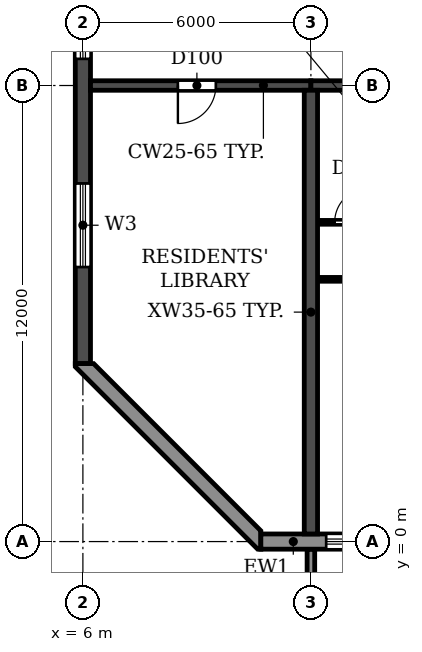
"""IFC4 building model, lengths in metres.
Left out: names, types, materials, properties, quantities, classifications, styles, units other than length and angle.
Written with IfcOpenShell. Run it as: python <this file> out.ifc"""

import sys

from ifc_helpers import new_model, si_unit, direction, frame, frame_2d, origin, place, context, subcontext, project, spatial, polyline, rectangle, outline, extrude, source, transform, mapped, element, fill, save


model = new_model("IFC4")
c1 = context("Model", 3, precision=1e-05, world=origin(), true_north=direction((0.0, 1.0)))
c2 = subcontext(c1, "Body", "Model", "MODEL_VIEW")
j1 = project(units=[si_unit("LENGTHUNIT", "METRE"), si_unit("PLANEANGLEUNIT", "RADIAN")], contexts=[c1])
p1 = place(None, origin())
s1 = spatial("IfcSite", under=j1, at=p1, CompositionType="ELEMENT")
p2 = place(p1, origin())
s2 = spatial("IfcBuilding", under=s1, at=p2, CompositionType="ELEMENT")
p3 = place(p2, frame((0.0, 0.0, 72.9)))
s3 = spatial("IfcBuildingStorey", under=s2, at=p3, CompositionType="ELEMENT", Elevation=72.9)
p4 = place(p3, frame((12.0, 0.2, 0.0), z_axis=(0.0, 0.0, 1.0), x_axis=(0.0, 1.0, 0.0)))
e1 = element("IfcWall", 1, at=p4, inside=s3, PredefinedType="SHEAR", context=c2, shape_type="SweptSolid", body=[
    extrude(rectangle(XDim=11.675, YDim=0.35, at=frame_2d((5.837, 0.0))), origin(), (0.0, 0.0, 1.0), 3.06),
])
p5 = place(p3, frame((6.0, 4.683, 0.0), z_axis=(0.0, 0.0, 1.0), x_axis=(0.0, 1.0, 0.0)))
e2 = element("IfcWall", 2, at=p5, inside=s3, PredefinedType="SHEAR", context=c2, shape_type="SweptSolid", body=[
    extrude(rectangle(XDim=34.234, YDim=0.4, at=frame_2d((17.117, 0.0))), origin(), (0.0, 0.0, 1.0), 3.06),
])
p6 = place(p5, frame((23.817, 0.0, 0.9)))
e3 = element("IfcOpeningElement", 3, at=p6, cuts=e2, PredefinedType="OPENING", context=c2, shape_type="SweptSolid", body=[
    extrude(rectangle(XDim=1.2, YDim=1.5, at=frame_2d((0.6, 0.75))), frame((0.0, 0.21, 0.0), z_axis=(0.0, -1.0, 0.0), x_axis=(1.0, 0.0, 0.0)), (0.0, 0.0, 1.0), 0.42),
])
p7 = place(p5, frame((8.017, 0.0, 0.9)))
e4 = element("IfcOpeningElement", 4, at=p7, cuts=e2, PredefinedType="OPENING", context=c2, shape_type="SweptSolid", body=[
    extrude(rectangle(XDim=1.2, YDim=1.5, at=frame_2d((0.6, 0.75))), frame((0.0, 0.21, 0.0), z_axis=(0.0, -1.0, 0.0), x_axis=(1.0, 0.0, 0.0)), (0.0, 0.0, 1.0), 0.42),
])
p8 = place(p5, frame((15.917, 0.0, 0.9)))
e5 = element("IfcOpeningElement", 5, at=p8, cuts=e2, PredefinedType="OPENING", context=c2, shape_type="SweptSolid", body=[
    extrude(rectangle(XDim=1.2, YDim=1.5, at=frame_2d((0.6, 0.75))), frame((0.0, 0.21, 0.0), z_axis=(0.0, -1.0, 0.0), x_axis=(1.0, 0.0, 0.0)), (0.0, 0.0, 1.0), 0.42),
])
p9 = place(p5, frame((28.894, 0.0, 0.6)))
e6 = element("IfcOpeningElement", 6, at=p9, cuts=e2, PredefinedType="OPENING", context=c2, shape_type="SweptSolid", body=[
    extrude(rectangle(XDim=2.2, YDim=1.8, at=frame_2d((1.1, 0.9))), frame((0.0, 0.21, 0.0), z_axis=(0.0, -1.0, 0.0), x_axis=(1.0, 0.0, 0.0)), (0.0, 0.0, 1.0), 0.42),
])
p10 = place(p5, frame((2.541, 0.0, 0.6)))
e7 = element("IfcOpeningElement", 7, at=p10, cuts=e2, PredefinedType="OPENING", context=c2, shape_type="SweptSolid", body=[
    extrude(rectangle(XDim=2.2, YDim=1.8, at=frame_2d((1.1, 0.9))), frame((0.0, 0.21, 0.0), z_axis=(0.0, -1.0, 0.0), x_axis=(1.0, 0.0, 0.0)), (0.0, 0.0, 1.0), 0.42),
])
p11 = place(p3, frame((6.2, 12.0, 0.0), z_axis=(0.0, 0.0, 1.0), x_axis=(1.0, 0.0, 0.0)))
e8 = element("IfcWall", 8, at=p11, inside=s3, PredefinedType="SHEAR", context=c2, shape_type="SweptSolid", body=[
    extrude(rectangle(XDim=5.8, YDim=0.25, at=frame_2d((2.9, 0.0))), origin(), (0.0, 0.0, 1.0), 2.46),
])
p12 = place(p11, frame((2.3, 0.0, 0.0)))
e9 = element("IfcOpeningElement", 9, at=p12, cuts=e8, PredefinedType="OPENING", context=c2, shape_type="SweptSolid", body=[
    extrude(rectangle(XDim=1.0, YDim=2.1, at=frame_2d((0.5, 1.05))), frame((0.0, 0.135, 0.0), z_axis=(0.0, -1.0, 0.0), x_axis=(1.0, 0.0, 0.0)), (0.0, 0.0, 1.0), 0.27),
])
p13 = place(p3, frame((12.0, 12.0, 0.0), z_axis=(0.0, 0.0, 1.0), x_axis=(1.0, 0.0, 0.0)))
e10 = element("IfcWall", 10, at=p13, inside=s3, PredefinedType="SHEAR", context=c2, shape_type="SweptSolid", body=[
    extrude(rectangle(XDim=6.0, YDim=0.25, at=frame_2d((3.0, 0.0))), origin(), (0.0, 0.0, 1.0), 2.46),
])
p14 = place(p13, frame((2.55, 0.0, 0.0)))
e11 = element("IfcOpeningElement", 11, at=p14, cuts=e10, PredefinedType="OPENING", context=c2, shape_type="SweptSolid", body=[
    extrude(rectangle(XDim=1.0, YDim=2.1, at=frame_2d((0.5, 1.05))), frame((0.0, 0.135, 0.0), z_axis=(0.0, -1.0, 0.0), x_axis=(1.0, 0.0, 0.0)), (0.0, 0.0, 1.0), 0.27),
])
p15 = place(p3, frame((10.683, 0.0, 0.0), z_axis=(0.0, 0.0, 1.0), x_axis=(1.0, 0.0, 0.0)))
e12 = element("IfcWall", 12, at=p15, inside=s3, PredefinedType="STANDARD", context=c2, shape_type="SweptSolid", body=[
    extrude(rectangle(XDim=80.634, YDim=0.4, at=frame_2d((40.317, 0.0))), origin(), (0.0, 0.0, 1.0), 3.06),
])
p16 = place(p15, frame((1.717, 0.0, 0.9)))
e13 = element("IfcOpeningElement", 13, at=p16, cuts=e12, PredefinedType="OPENING", context=c2, shape_type="SweptSolid", body=[
    extrude(rectangle(XDim=2.2, YDim=1.5, at=frame_2d((1.1, 0.75))), frame((0.0, 0.21, 0.0), z_axis=(0.0, -1.0, 0.0), x_axis=(1.0, 0.0, 0.0)), (0.0, 0.0, 1.0), 0.42),
])
p17 = place(p15, frame((4.917, 0.0, 0.0)))
e14 = element("IfcOpeningElement", 14, at=p17, cuts=e12, PredefinedType="OPENING", context=c2, shape_type="SweptSolid", body=[
    extrude(rectangle(XDim=1.8, YDim=2.4, at=frame_2d((0.9, 1.2))), frame((0.0, 0.21, 0.0), z_axis=(0.0, -1.0, 0.0), x_axis=(1.0, 0.0, 0.0)), (0.0, 0.0, 1.0), 0.42),
])
p18 = place(p15, frame((7.717, 0.0, 0.9)))
e15 = element("IfcOpeningElement", 15, at=p18, cuts=e12, PredefinedType="OPENING", context=c2, shape_type="SweptSolid", body=[
    extrude(rectangle(XDim=2.2, YDim=1.5, at=frame_2d((1.1, 0.75))), frame((0.0, 0.21, 0.0), z_axis=(0.0, -1.0, 0.0), x_axis=(1.0, 0.0, 0.0)), (0.0, 0.0, 1.0), 0.42),
])
p19 = place(p15, frame((10.717, 0.0, 0.9)))
e16 = element("IfcOpeningElement", 16, at=p19, cuts=e12, PredefinedType="OPENING", context=c2, shape_type="SweptSolid", body=[
    extrude(rectangle(XDim=2.2, YDim=1.5, at=frame_2d((1.1, 0.75))), frame((0.0, 0.21, 0.0), z_axis=(0.0, -1.0, 0.0), x_axis=(1.0, 0.0, 0.0)), (0.0, 0.0, 1.0), 0.42),
])
p20 = place(p15, frame((13.717, 0.0, 0.9)))
e17 = element("IfcOpeningElement", 17, at=p20, cuts=e12, PredefinedType="OPENING", context=c2, shape_type="SweptSolid", body=[
    extrude(rectangle(XDim=2.2, YDim=1.5, at=frame_2d((1.1, 0.75))), frame((0.0, 0.21, 0.0), z_axis=(0.0, -1.0, 0.0), x_axis=(1.0, 0.0, 0.0)), (0.0, 0.0, 1.0), 0.42),
])
p21 = place(p15, frame((16.917, 0.0, 0.0)))
e18 = element("IfcOpeningElement", 18, at=p21, cuts=e12, PredefinedType="OPENING", context=c2, shape_type="SweptSolid", body=[
    extrude(rectangle(XDim=1.8, YDim=2.4, at=frame_2d((0.9, 1.2))), frame((0.0, 0.21, 0.0), z_axis=(0.0, -1.0, 0.0), x_axis=(1.0, 0.0, 0.0)), (0.0, 0.0, 1.0), 0.42),
])
p22 = place(p15, frame((19.717, 0.0, 0.9)))
e19 = element("IfcOpeningElement", 19, at=p22, cuts=e12, PredefinedType="OPENING", context=c2, shape_type="SweptSolid", body=[
    extrude(rectangle(XDim=2.2, YDim=1.5, at=frame_2d((1.1, 0.75))), frame((0.0, 0.21, 0.0), z_axis=(0.0, -1.0, 0.0), x_axis=(1.0, 0.0, 0.0)), (0.0, 0.0, 1.0), 0.42),
])
p23 = place(p15, frame((22.717, 0.0, 0.9)))
e20 = element("IfcOpeningElement", 20, at=p23, cuts=e12, PredefinedType="OPENING", context=c2, shape_type="SweptSolid", body=[
    extrude(rectangle(XDim=2.2, YDim=1.5, at=frame_2d((1.1, 0.75))), frame((0.0, 0.21, 0.0), z_axis=(0.0, -1.0, 0.0), x_axis=(1.0, 0.0, 0.0)), (0.0, 0.0, 1.0), 0.42),
])
p24 = place(p15, frame((25.917, 0.0, 0.0)))
e21 = element("IfcOpeningElement", 21, at=p24, cuts=e12, PredefinedType="OPENING", context=c2, shape_type="SweptSolid", body=[
    extrude(rectangle(XDim=1.8, YDim=2.4, at=frame_2d((0.9, 1.2))), frame((0.0, 0.21, 0.0), z_axis=(0.0, -1.0, 0.0), x_axis=(1.0, 0.0, 0.0)), (0.0, 0.0, 1.0), 0.42),
])
p25 = place(p15, frame((28.717, 0.0, 0.9)))
e22 = element("IfcOpeningElement", 22, at=p25, cuts=e12, PredefinedType="OPENING", context=c2, shape_type="SweptSolid", body=[
    extrude(rectangle(XDim=2.2, YDim=1.5, at=frame_2d((1.1, 0.75))), frame((0.0, 0.21, 0.0), z_axis=(0.0, -1.0, 0.0), x_axis=(1.0, 0.0, 0.0)), (0.0, 0.0, 1.0), 0.42),
])
p26 = place(p15, frame((31.717, 0.0, 0.9)))
e23 = element("IfcOpeningElement", 23, at=p26, cuts=e12, PredefinedType="OPENING", context=c2, shape_type="SweptSolid", body=[
    extrude(rectangle(XDim=2.2, YDim=1.5, at=frame_2d((1.1, 0.75))), frame((0.0, 0.21, 0.0), z_axis=(0.0, -1.0, 0.0), x_axis=(1.0, 0.0, 0.0)), (0.0, 0.0, 1.0), 0.42),
])
p27 = place(p15, frame((34.717, 0.0, 0.9)))
e24 = element("IfcOpeningElement", 24, at=p27, cuts=e12, PredefinedType="OPENING", context=c2, shape_type="SweptSolid", body=[
    extrude(rectangle(XDim=2.2, YDim=1.5, at=frame_2d((1.1, 0.75))), frame((0.0, 0.21, 0.0), z_axis=(0.0, -1.0, 0.0), x_axis=(1.0, 0.0, 0.0)), (0.0, 0.0, 1.0), 0.42),
])
p28 = place(p15, frame((37.917, 0.0, 0.0)))
e25 = element("IfcOpeningElement", 25, at=p28, cuts=e12, PredefinedType="OPENING", context=c2, shape_type="SweptSolid", body=[
    extrude(rectangle(XDim=1.8, YDim=2.4, at=frame_2d((0.9, 1.2))), frame((0.0, 0.21, 0.0), z_axis=(0.0, -1.0, 0.0), x_axis=(1.0, 0.0, 0.0)), (0.0, 0.0, 1.0), 0.42),
])
p29 = place(p15, frame((40.717, 0.0, 0.9)))
e26 = element("IfcOpeningElement", 26, at=p29, cuts=e12, PredefinedType="OPENING", context=c2, shape_type="SweptSolid", body=[
    extrude(rectangle(XDim=2.2, YDim=1.5, at=frame_2d((1.1, 0.75))), frame((0.0, 0.21, 0.0), z_axis=(0.0, -1.0, 0.0), x_axis=(1.0, 0.0, 0.0)), (0.0, 0.0, 1.0), 0.42),
])
p30 = place(p15, frame((43.717, 0.0, 0.9)))
e27 = element("IfcOpeningElement", 27, at=p30, cuts=e12, PredefinedType="OPENING", context=c2, shape_type="SweptSolid", body=[
    extrude(rectangle(XDim=2.2, YDim=1.5, at=frame_2d((1.1, 0.75))), frame((0.0, 0.21, 0.0), z_axis=(0.0, -1.0, 0.0), x_axis=(1.0, 0.0, 0.0)), (0.0, 0.0, 1.0), 0.42),
])
p31 = place(p15, frame((46.717, 0.0, 0.9)))
e28 = element("IfcOpeningElement", 28, at=p31, cuts=e12, PredefinedType="OPENING", context=c2, shape_type="SweptSolid", body=[
    extrude(rectangle(XDim=2.2, YDim=1.5, at=frame_2d((1.1, 0.75))), frame((0.0, 0.21, 0.0), z_axis=(0.0, -1.0, 0.0), x_axis=(1.0, 0.0, 0.0)), (0.0, 0.0, 1.0), 0.42),
])
p32 = place(p15, frame((49.917, 0.0, 0.0)))
e29 = element("IfcOpeningElement", 29, at=p32, cuts=e12, PredefinedType="OPENING", context=c2, shape_type="SweptSolid", body=[
    extrude(rectangle(XDim=1.8, YDim=2.4, at=frame_2d((0.9, 1.2))), frame((0.0, 0.21, 0.0), z_axis=(0.0, -1.0, 0.0), x_axis=(1.0, 0.0, 0.0)), (0.0, 0.0, 1.0), 0.42),
])
p33 = place(p15, frame((52.717, 0.0, 0.9)))
e30 = element("IfcOpeningElement", 30, at=p33, cuts=e12, PredefinedType="OPENING", context=c2, shape_type="SweptSolid", body=[
    extrude(rectangle(XDim=2.2, YDim=1.5, at=frame_2d((1.1, 0.75))), frame((0.0, 0.21, 0.0), z_axis=(0.0, -1.0, 0.0), x_axis=(1.0, 0.0, 0.0)), (0.0, 0.0, 1.0), 0.42),
])
p34 = place(p15, frame((55.717, 0.0, 0.9)))
e31 = element("IfcOpeningElement", 31, at=p34, cuts=e12, PredefinedType="OPENING", context=c2, shape_type="SweptSolid", body=[
    extrude(rectangle(XDim=2.2, YDim=1.5, at=frame_2d((1.1, 0.75))), frame((0.0, 0.21, 0.0), z_axis=(0.0, -1.0, 0.0), x_axis=(1.0, 0.0, 0.0)), (0.0, 0.0, 1.0), 0.42),
])
p35 = place(p15, frame((58.717, 0.0, 0.9)))
e32 = element("IfcOpeningElement", 32, at=p35, cuts=e12, PredefinedType="OPENING", context=c2, shape_type="SweptSolid", body=[
    extrude(rectangle(XDim=2.2, YDim=1.5, at=frame_2d((1.1, 0.75))), frame((0.0, 0.21, 0.0), z_axis=(0.0, -1.0, 0.0), x_axis=(1.0, 0.0, 0.0)), (0.0, 0.0, 1.0), 0.42),
])
p36 = place(p15, frame((61.717, 0.0, 0.9)))
e33 = element("IfcOpeningElement", 33, at=p36, cuts=e12, PredefinedType="OPENING", context=c2, shape_type="SweptSolid", body=[
    extrude(rectangle(XDim=2.2, YDim=1.5, at=frame_2d((1.1, 0.75))), frame((0.0, 0.21, 0.0), z_axis=(0.0, -1.0, 0.0), x_axis=(1.0, 0.0, 0.0)), (0.0, 0.0, 1.0), 0.42),
])
p37 = place(p15, frame((64.917, 0.0, 0.0)))
e34 = element("IfcOpeningElement", 34, at=p37, cuts=e12, PredefinedType="OPENING", context=c2, shape_type="SweptSolid", body=[
    extrude(rectangle(XDim=1.8, YDim=2.4, at=frame_2d((0.9, 1.2))), frame((0.0, 0.21, 0.0), z_axis=(0.0, -1.0, 0.0), x_axis=(1.0, 0.0, 0.0)), (0.0, 0.0, 1.0), 0.42),
])
p38 = place(p15, frame((67.717, 0.0, 0.9)))
e35 = element("IfcOpeningElement", 35, at=p38, cuts=e12, PredefinedType="OPENING", context=c2, shape_type="SweptSolid", body=[
    extrude(rectangle(XDim=2.2, YDim=1.5, at=frame_2d((1.1, 0.75))), frame((0.0, 0.21, 0.0), z_axis=(0.0, -1.0, 0.0), x_axis=(1.0, 0.0, 0.0)), (0.0, 0.0, 1.0), 0.42),
])
p39 = place(p15, frame((70.717, 0.0, 0.9)))
e36 = element("IfcOpeningElement", 36, at=p39, cuts=e12, PredefinedType="OPENING", context=c2, shape_type="SweptSolid", body=[
    extrude(rectangle(XDim=2.2, YDim=1.5, at=frame_2d((1.1, 0.75))), frame((0.0, 0.21, 0.0), z_axis=(0.0, -1.0, 0.0), x_axis=(1.0, 0.0, 0.0)), (0.0, 0.0, 1.0), 0.42),
])
p40 = place(p15, frame((73.917, 0.0, 0.0)))
e37 = element("IfcOpeningElement", 37, at=p40, cuts=e12, PredefinedType="OPENING", context=c2, shape_type="SweptSolid", body=[
    extrude(rectangle(XDim=1.8, YDim=2.4, at=frame_2d((0.9, 1.2))), frame((0.0, 0.21, 0.0), z_axis=(0.0, -1.0, 0.0), x_axis=(1.0, 0.0, 0.0)), (0.0, 0.0, 1.0), 0.42),
])
p41 = place(p15, frame((76.717, 0.0, 0.9)))
e38 = element("IfcOpeningElement", 38, at=p41, cuts=e12, PredefinedType="OPENING", context=c2, shape_type="SweptSolid", body=[
    extrude(rectangle(XDim=2.2, YDim=1.5, at=frame_2d((1.1, 0.75))), frame((0.0, 0.21, 0.0), z_axis=(0.0, -1.0, 0.0), x_axis=(1.0, 0.0, 0.0)), (0.0, 0.0, 1.0), 0.42),
])
p42 = place(p3, origin())
e39 = element("IfcWall", 39, at=p42, inside=s3, PredefinedType="STANDARD", context=c2, shape_type="SweptSolid", body=[
    extrude(outline(polyline([(5.8, 4.683), (5.8, 4.6), (10.6, -0.2), (10.683, -0.2), (10.683, 0.283), (6.283, 4.683), (5.8, 4.683)])), origin(), (0.0, 0.0, 1.0), 3.06),
])
m1 = source(origin(), c2, "Body", "SweptSolid", [
    extrude(outline(polyline([(0.0, 0.0), (0.2, 0.0), (0.2, 1.65), (0.0, 1.65), (0.0, 0.0)])), origin(), (0.0, 0.0, 1.0), 3.1),
])
p43 = place(p3, frame((11.9, -1.85, 0.0)))
e40 = element("IfcWall", 40, at=p43, inside=s3, PredefinedType="STANDARD", context=c2, shape_type="MappedRepresentation", body=[
    mapped(m1, transform((0.0, 0.0, 0.0))),
])
p44 = place(p3, frame((12.185, 6.9, 0.0), z_axis=(0.0, 0.0, 1.0), x_axis=(1.0, 0.0, 0.0)))
e41 = element("IfcWall", 41, at=p44, inside=s3, PredefinedType="PARTITIONING", context=c2, shape_type="SweptSolid", body=[
    extrude(rectangle(XDim=2.865, YDim=0.1, at=frame_2d((1.433, 0.0))), origin(), (0.0, 0.0, 1.0), 3.06),
])
p45 = place(p44, frame((1.415, 0.0, 0.0)))
e42 = element("IfcOpeningElement", 42, at=p45, cuts=e41, PredefinedType="OPENING", context=c2, shape_type="SweptSolid", body=[
    extrude(rectangle(XDim=0.9, YDim=2.1, at=frame_2d((0.45, 1.05))), frame((0.0, 0.06, 0.0), z_axis=(0.0, -1.0, 0.0), x_axis=(1.0, 0.0, 0.0)), (0.0, 0.0, 1.0), 0.12),
])
p46 = place(p3, frame((12.185, 8.4, 0.0), z_axis=(0.0, 0.0, 1.0), x_axis=(1.0, 0.0, 0.0)))
e43 = element("IfcWall", 43, at=p46, inside=s3, PredefinedType="PARTITIONING", context=c2, shape_type="SweptSolid", body=[
    extrude(rectangle(XDim=2.015, YDim=0.1, at=frame_2d((1.007, 0.0))), origin(), (0.0, 0.0, 1.0), 3.06),
])
p47 = place(p46, frame((0.44, 0.0, 0.0)))
e44 = element("IfcOpeningElement", 44, at=p47, cuts=e43, PredefinedType="OPENING", context=c2, shape_type="SweptSolid", body=[
    extrude(rectangle(XDim=0.9, YDim=2.1, at=frame_2d((0.45, 1.05))), frame((0.0, 0.06, 0.0), z_axis=(0.0, -1.0, 0.0), x_axis=(1.0, 0.0, 0.0)), (0.0, 0.0, 1.0), 0.12),
])
p48 = place(p16, origin())
e45 = element("IfcWindow", 45, at=p48, inside=s3, PartitioningType="DOUBLE_PANEL_HORIZONTAL", PredefinedType="WINDOW", context=c2, shape_type="SweptSolid", body=[
    extrude(rectangle(XDim=2.2, YDim=1.5, at=frame_2d((1.1, 0.75))), frame((0.0, 0.03, 0.0), z_axis=(0.0, -1.0, 0.0), x_axis=(1.0, 0.0, 0.0)), (0.0, 0.0, 1.0), 0.06),
])
fill(e13, e45)
p49 = place(p7, origin())
e46 = element("IfcWindow", 46, at=p49, inside=s3, PartitioningType="SINGLE_PANEL", PredefinedType="WINDOW", context=c2, shape_type="SweptSolid", body=[
    extrude(rectangle(XDim=1.2, YDim=1.5, at=frame_2d((0.6, 0.75))), frame((0.0, 0.03, 0.0), z_axis=(0.0, -1.0, 0.0), x_axis=(1.0, 0.0, 0.0)), (0.0, 0.0, 1.0), 0.06),
])
fill(e4, e46)
p50 = place(p10, origin())
e47 = element("IfcWindow", 47, at=p50, inside=s3, PartitioningType="DOUBLE_PANEL_HORIZONTAL", PredefinedType="WINDOW", context=c2, shape_type="SweptSolid", body=[
    extrude(rectangle(XDim=2.2, YDim=1.8, at=frame_2d((1.1, 0.9))), frame((0.0, 0.03, 0.0), z_axis=(0.0, -1.0, 0.0), x_axis=(1.0, 0.0, 0.0)), (0.0, 0.0, 1.0), 0.06),
])
fill(e7, e47)
p51 = place(p12, frame((1.0, 0.0, 0.0), z_axis=(0.0, 0.0, 1.0), x_axis=(-1.0, 0.0, 0.0)))
e48 = element("IfcDoor", 48, at=p51, inside=s3, OperationType="SINGLE_SWING_RIGHT", PredefinedType="DOOR", context=c2, shape_type="SweptSolid", body=[
    extrude(rectangle(XDim=1.0, YDim=2.1, at=frame_2d((0.5, 1.05))), frame((0.0, 0.025, 0.0), z_axis=(0.0, -1.0, 0.0), x_axis=(1.0, 0.0, 0.0)), (0.0, 0.0, 1.0), 0.05),
])
fill(e9, e48)
p52 = place(p47, origin())
e49 = element("IfcDoor", 49, at=p52, inside=s3, OperationType="SINGLE_SWING_RIGHT", PredefinedType="DOOR", context=c2, shape_type="SweptSolid", body=[
    extrude(rectangle(XDim=0.9, YDim=2.1, at=frame_2d((0.45, 1.05))), frame((0.0, 0.025, 0.0), z_axis=(0.0, -1.0, 0.0), x_axis=(1.0, 0.0, 0.0)), (0.0, 0.0, 1.0), 0.05),
])
fill(e44, e49)
save(model, sys.argv[1])
